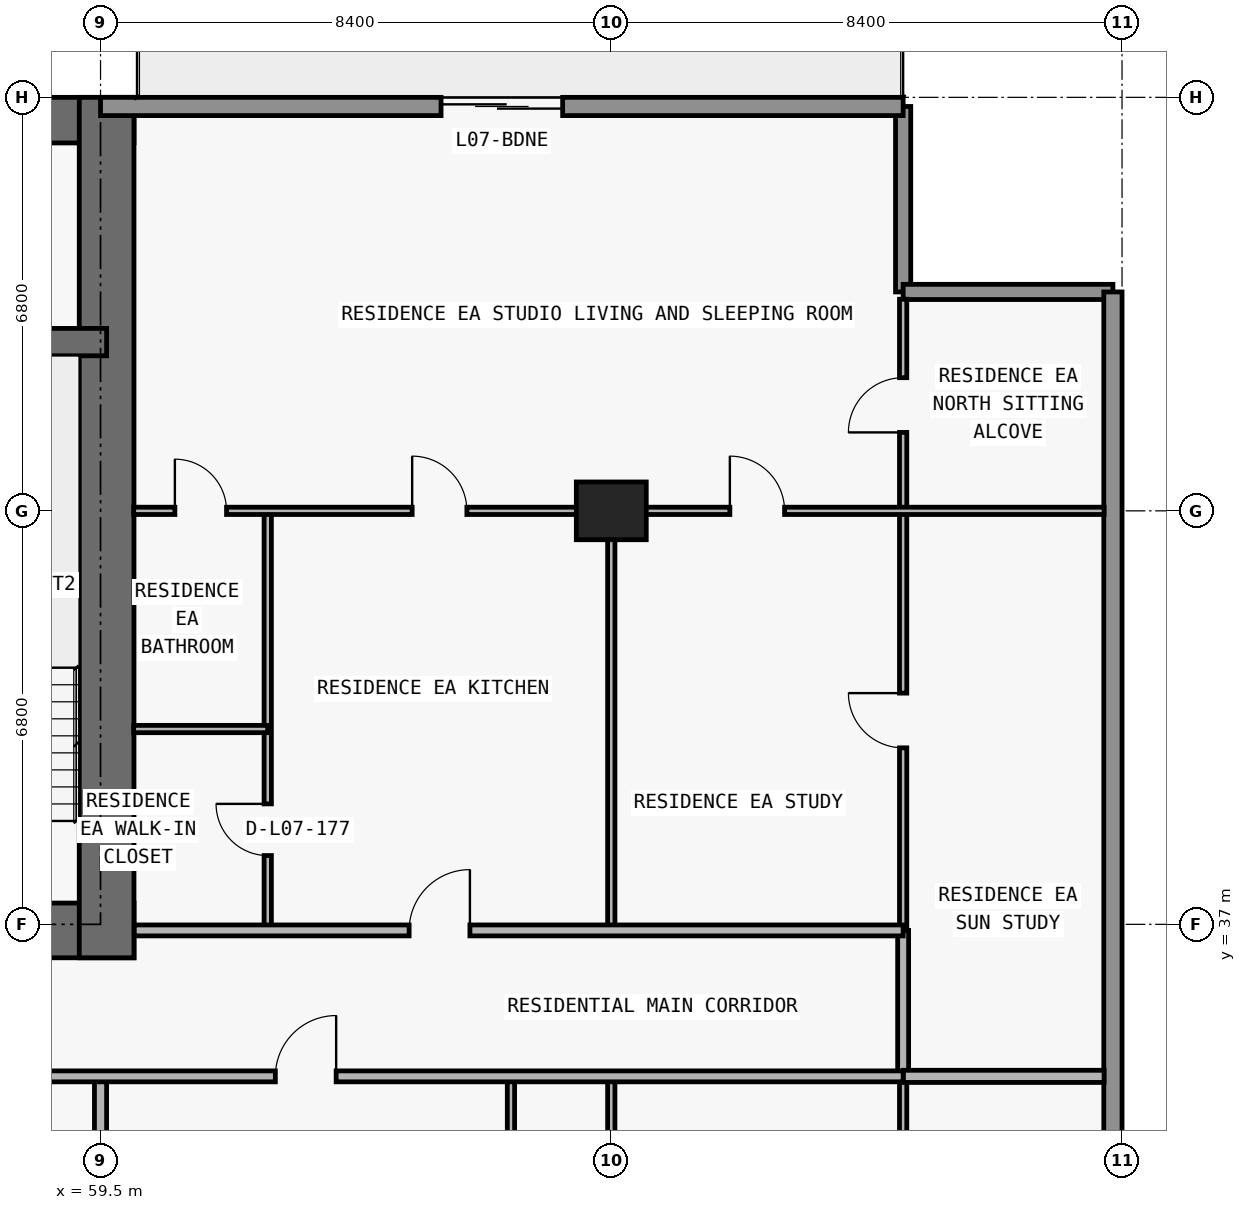
"""IFC4 building model, lengths in metres.
Left out: names, types, materials, properties, quantities, classifications, styles, units other than length and angle.
Written with IfcOpenShell. Run it as: python <this file> out.ifc"""

import sys

from ifc_helpers import new_model, si_unit, direction, frame, frame_2d, origin, origin_2d, place, context, subcontext, project, spatial, rectangle, extrude, element, fill, save


model = new_model("IFC4")
c1 = context("Model", 3, precision=1e-05, world=origin(), true_north=direction((0.0, 1.0)))
c2 = subcontext(c1, "Body", "Model", "MODEL_VIEW")
j1 = project(units=[si_unit("LENGTHUNIT", "METRE"), si_unit("PLANEANGLEUNIT", "RADIAN")], contexts=[c1])
p1 = place(None, origin())
s1 = spatial("IfcSite", under=j1, at=p1, CompositionType="ELEMENT")
p2 = place(p1, origin())
s2 = spatial("IfcBuilding", under=s1, at=p2, CompositionType="ELEMENT")
p3 = place(p2, frame((0.0, 0.0, 33.3)))
s3 = spatial("IfcBuildingStorey", under=s2, at=p3, CompositionType="ELEMENT", Elevation=33.3)
p4 = place(p3, frame((67.9, 43.8, 0.0), z_axis=(0.0, 0.0, 1.0), x_axis=(1.0, 0.0, 0.0)))
e1 = element("IfcColumn", 1, at=p4, inside=s3, PredefinedType="COLUMN", context=c2, shape_type="SweptSolid", body=[
    extrude(rectangle(XDim=1.15, YDim=0.95, at=origin_2d()), origin(), (0.0, 0.0, 1.0), 3.05),
])
p5 = place(p3, frame((17.75, 36.9, 0.0), z_axis=(0.0, 0.0, 1.0), x_axis=(1.0, 0.0, 0.0)))
e2 = element("IfcWall", 2, at=p5, inside=s3, PredefinedType="SHEAR", context=c2, shape_type="SweptSolid", body=[
    extrude(rectangle(XDim=42.3, YDim=0.9, at=frame_2d((21.15, 0.0))), origin(), (0.0, 0.0, 1.0), 3.05),
])
p6 = place(p5, frame((14.55, 0.0, 0.0)))
e3 = element("IfcOpeningElement", 3, at=p6, cuts=e2, PredefinedType="OPENING", context=c2, shape_type="SweptSolid", body=[
    extrude(rectangle(XDim=1.1, YDim=2.15, at=frame_2d((0.55, 1.075))), frame((0.0, 0.46, 0.0), z_axis=(0.0, -1.0, 0.0), x_axis=(1.0, 0.0, 0.0)), (0.0, 0.0, 1.0), 0.92),
])
p7 = place(p5, frame((6.4, 0.0, 0.0)))
e4 = element("IfcOpeningElement", 4, at=p7, cuts=e2, PredefinedType="OPENING", context=c2, shape_type="SweptSolid", body=[
    extrude(rectangle(XDim=1.05, YDim=2.15, at=frame_2d((0.525, 1.075))), frame((0.0, 0.46, 0.0), z_axis=(0.0, -1.0, 0.0), x_axis=(1.0, 0.0, 0.0)), (0.0, 0.0, 1.0), 0.92),
])
p8 = place(p5, frame((34.9, 0.0, 0.0)))
e5 = element("IfcOpeningElement", 5, at=p8, cuts=e2, PredefinedType="OPENING", context=c2, shape_type="SweptSolid", body=[
    extrude(rectangle(XDim=1.05, YDim=2.15, at=frame_2d((0.525, 1.075))), frame((0.0, 0.46, 0.0), z_axis=(0.0, -1.0, 0.0), x_axis=(1.0, 0.0, 0.0)), (0.0, 0.0, 1.0), 0.92),
])
p9 = place(p5, frame((11.012, 0.0, 0.0)))
e6 = element("IfcOpeningElement", 6, at=p9, cuts=e2, PredefinedType="OPENING", context=c2, shape_type="SweptSolid", body=[
    extrude(rectangle(XDim=1.05, YDim=2.15, at=frame_2d((0.525, 1.075))), frame((0.0, 0.46, 0.0), z_axis=(0.0, -1.0, 0.0), x_axis=(1.0, 0.0, 0.0)), (0.0, 0.0, 1.0), 0.92),
])
p10 = place(p5, frame((24.25, 0.0, 0.0)))
e7 = element("IfcOpeningElement", 7, at=p10, cuts=e2, PredefinedType="OPENING", context=c2, shape_type="SweptSolid", body=[
    extrude(rectangle(XDim=1.05, YDim=2.15, at=frame_2d((0.525, 1.075))), frame((0.0, 0.46, 0.0), z_axis=(0.0, -1.0, 0.0), x_axis=(1.0, 0.0, 0.0)), (0.0, 0.0, 1.0), 0.92),
])
p11 = place(p3, frame((17.75, 50.225, 0.0), z_axis=(0.0, 0.0, 1.0), x_axis=(1.0, 0.0, 0.0)))
e8 = element("IfcWall", 8, at=p11, inside=s3, PredefinedType="SHEAR", context=c2, shape_type="SweptSolid", body=[
    extrude(rectangle(XDim=42.3, YDim=0.75, at=frame_2d((21.15, 0.0))), origin(), (0.0, 0.0, 1.0), 3.05),
])
p12 = place(p3, frame((59.6, 36.45, 0.0), z_axis=(0.0, 0.0, 1.0), x_axis=(0.0, 1.0, 0.0)))
e9 = element("IfcWall", 9, at=p12, inside=s3, PredefinedType="SHEAR", context=c2, shape_type="SweptSolid", body=[
    extrude(rectangle(XDim=14.15, YDim=0.9, at=frame_2d((7.075, 0.0))), origin(), (0.0, 0.0, 1.0), 3.05),
])
p13 = place(p3, frame((18.2, 46.575, 0.0), z_axis=(0.0, 0.0, 1.0), x_axis=(1.0, 0.0, 0.0)))
e10 = element("IfcWall", 10, at=p13, inside=s3, PredefinedType="SHEAR", context=c2, shape_type="SweptSolid", body=[
    extrude(rectangle(XDim=41.4, YDim=0.45, at=frame_2d((20.7, 0.0))), origin(), (0.0, 0.0, 1.0), 3.05),
])
p14 = place(p13, frame((7.675, 0.0, 0.0)))
e11 = element("IfcOpeningElement", 11, at=p14, cuts=e10, PredefinedType="OPENING", context=c2, shape_type="SweptSolid", body=[
    extrude(rectangle(XDim=1.05, YDim=2.15, at=frame_2d((0.525, 1.075))), frame((0.0, 0.235, 0.0), z_axis=(0.0, -1.0, 0.0), x_axis=(1.0, 0.0, 0.0)), (0.0, 0.0, 1.0), 0.47),
])
p15 = place(p13, frame((32.725, 0.0, 0.0)))
e12 = element("IfcOpeningElement", 12, at=p15, cuts=e10, PredefinedType="OPENING", context=c2, shape_type="SweptSolid", body=[
    extrude(rectangle(XDim=1.05, YDim=2.15, at=frame_2d((0.525, 1.075))), frame((0.0, 0.235, 0.0), z_axis=(0.0, -1.0, 0.0), x_axis=(1.0, 0.0, 0.0)), (0.0, 0.0, 1.0), 0.47),
])
p16 = place(p3, frame((72.7, 50.45, 0.0), z_axis=(0.0, 0.0, 1.0), x_axis=(0.0, -1.0, 0.0)))
e13 = element("IfcWall", 13, at=p16, inside=s3, PredefinedType="ELEMENTEDWALL", context=c2, shape_type="SweptSolid", body=[
    extrude(rectangle(XDim=3.05, YDim=0.25, at=frame_2d((1.525, 0.0))), origin(), (0.0, 0.0, 1.0), 3.05),
])
p17 = place(p3, frame((72.7, 47.4, 0.0), z_axis=(0.0, 0.0, 1.0), x_axis=(1.0, 0.0, 0.0)))
e14 = element("IfcWall", 14, at=p17, inside=s3, PredefinedType="ELEMENTEDWALL", context=c2, shape_type="SweptSolid", body=[
    extrude(rectangle(XDim=3.45, YDim=0.25, at=frame_2d((1.725, 0.0))), origin(), (0.0, 0.0, 1.0), 3.05),
])
p18 = place(p3, frame((76.15, 47.4, 0.0), z_axis=(0.0, 0.0, 1.0), x_axis=(0.0, -1.0, 0.0)))
e15 = element("IfcWall", 15, at=p18, inside=s3, PredefinedType="STANDARD", context=c2, shape_type="SweptSolid", body=[
    extrude(rectangle(XDim=20.6, YDim=0.3, at=frame_2d((10.3, 0.0))), origin(), (0.0, 0.0, 1.0), 3.05),
])
p19 = place(p3, frame((59.5, 50.45, 0.0), z_axis=(0.0, 0.0, 1.0), x_axis=(1.0, 0.0, 0.0)))
e16 = element("IfcWall", 16, at=p19, inside=s3, PredefinedType="STANDARD", context=c2, shape_type="SweptSolid", body=[
    extrude(rectangle(XDim=13.2, YDim=0.3, at=frame_2d((6.6, 0.0))), origin(), (0.0, 0.0, 1.0), 3.05),
])
p20 = place(p19, frame((5.6, 0.0, 0.0)))
e17 = element("IfcOpeningElement", 17, at=p20, cuts=e16, PredefinedType="OPENING", context=c2, shape_type="SweptSolid", body=[
    extrude(rectangle(XDim=2.0, YDim=2.3, at=frame_2d((1.0, 1.15))), frame((0.0, 0.16, 0.0), z_axis=(0.0, -1.0, 0.0), x_axis=(1.0, 0.0, 0.0)), (0.0, 0.0, 1.0), 0.32),
])
p21 = place(p3, frame((59.5, 27.64, 0.0), z_axis=(0.0, 0.0, 1.0), x_axis=(0.0, 1.0, 0.0)))
e18 = element("IfcWall", 18, at=p21, inside=s3, PredefinedType="PARTITIONING", context=c2, shape_type="SweptSolid", body=[
    extrude(rectangle(XDim=6.86, YDim=0.2, at=frame_2d((3.43, 0.0))), origin(), (0.0, 0.0, 1.0), 2.11),
])
p22 = place(p3, frame((62.25, 36.9, 0.0), z_axis=(0.0, 0.0, 1.0), x_axis=(0.0, 1.0, 0.0)))
e19 = element("IfcWall", 19, at=p22, inside=s3, PredefinedType="PARTITIONING", context=c2, shape_type="SweptSolid", body=[
    extrude(rectangle(XDim=6.9, YDim=0.12, at=frame_2d((3.45, 0.0))), origin(), (0.0, 0.0, 1.0), 3.05),
])
p23 = place(p22, frame((1.231, 0.0, 0.0)))
e20 = element("IfcOpeningElement", 20, at=p23, cuts=e19, PredefinedType="OPENING", context=c2, shape_type="SweptSolid", body=[
    extrude(rectangle(XDim=0.85, YDim=2.1, at=frame_2d((0.425, 1.05))), frame((0.0, 0.07, 0.0), z_axis=(0.0, -1.0, 0.0), x_axis=(1.0, 0.0, 0.0)), (0.0, 0.0, 1.0), 0.14),
])
p24 = place(p3, frame((66.25, 27.64, 0.0), z_axis=(0.0, 0.0, 1.0), x_axis=(0.0, 1.0, 0.0)))
e21 = element("IfcWall", 21, at=p24, inside=s3, PredefinedType="PARTITIONING", context=c2, shape_type="SweptSolid", body=[
    extrude(rectangle(XDim=6.86, YDim=0.12, at=frame_2d((3.43, 0.0))), origin(), (0.0, 0.0, 1.0), 3.05),
])
p25 = place(p24, frame((3.005, 0.0, 0.0)))
e22 = element("IfcOpeningElement", 22, at=p25, cuts=e21, PredefinedType="OPENING", context=c2, shape_type="SweptSolid", body=[
    extrude(rectangle(XDim=0.85, YDim=2.1, at=frame_2d((0.425, 1.05))), frame((0.0, 0.07, 0.0), z_axis=(0.0, -1.0, 0.0), x_axis=(1.0, 0.0, 0.0)), (0.0, 0.0, 1.0), 0.14),
])
p26 = place(p3, frame((67.9, 27.64, 0.0), z_axis=(0.0, 0.0, 1.0), x_axis=(0.0, 1.0, 0.0)))
e23 = element("IfcWall", 23, at=p26, inside=s3, PredefinedType="PARTITIONING", context=c2, shape_type="SweptSolid", body=[
    extrude(rectangle(XDim=6.86, YDim=0.12, at=frame_2d((3.43, 0.0))), origin(), (0.0, 0.0, 1.0), 2.11),
])
p27 = place(p3, frame((67.9, 36.9, 0.0), z_axis=(0.0, 0.0, 1.0), x_axis=(0.0, 1.0, 0.0)))
e24 = element("IfcWall", 24, at=p27, inside=s3, PredefinedType="PARTITIONING", context=c2, shape_type="SweptSolid", body=[
    extrude(rectangle(XDim=6.9, YDim=0.12, at=frame_2d((3.45, 0.0))), origin(), (0.0, 0.0, 1.0), 2.11),
])
p28 = place(p3, frame((72.7, 27.64, 0.0), z_axis=(0.0, 0.0, 1.0), x_axis=(0.0, 1.0, 0.0)))
e25 = element("IfcWall", 25, at=p28, inside=s3, PredefinedType="PARTITIONING", context=c2, shape_type="SweptSolid", body=[
    extrude(rectangle(XDim=6.86, YDim=0.12, at=frame_2d((3.43, 0.0))), origin(), (0.0, 0.0, 1.0), 3.05),
])
p29 = place(p3, frame((72.7, 34.505, 0.0), z_axis=(0.0, 0.0, 1.0), x_axis=(0.0, 1.0, 0.0)))
e26 = element("IfcWall", 26, at=p29, inside=s3, PredefinedType="PARTITIONING", context=c2, shape_type="SweptSolid", body=[
    extrude(rectangle(XDim=2.395, YDim=0.18, at=frame_2d((1.198, 0.0))), origin(), (0.0, 0.0, 1.0), 3.05),
])
p30 = place(p3, frame((72.7, 36.905, 0.0), z_axis=(0.0, 0.0, 1.0), x_axis=(0.0, 1.0, 0.0)))
e27 = element("IfcWall", 27, at=p30, inside=s3, PredefinedType="PARTITIONING", context=c2, shape_type="SweptSolid", body=[
    extrude(rectangle(XDim=10.375, YDim=0.12, at=frame_2d((5.188, 0.0))), origin(), (0.0, 0.0, 1.0), 3.05),
])
p31 = place(p30, frame((2.998, 0.0, 0.0)))
e28 = element("IfcOpeningElement", 28, at=p31, cuts=e27, PredefinedType="OPENING", context=c2, shape_type="SweptSolid", body=[
    extrude(rectangle(XDim=0.9, YDim=2.15, at=frame_2d((0.45, 1.075))), frame((0.0, 0.07, 0.0), z_axis=(0.0, -1.0, 0.0), x_axis=(1.0, 0.0, 0.0)), (0.0, 0.0, 1.0), 0.14),
])
p32 = place(p30, frame((8.185, 0.0, 0.0)))
e29 = element("IfcOpeningElement", 29, at=p32, cuts=e27, PredefinedType="OPENING", context=c2, shape_type="SweptSolid", body=[
    extrude(rectangle(XDim=0.9, YDim=2.15, at=frame_2d((0.45, 1.075))), frame((0.0, 0.07, 0.0), z_axis=(0.0, -1.0, 0.0), x_axis=(1.0, 0.0, 0.0)), (0.0, 0.0, 1.0), 0.14),
])
p33 = place(p3, frame((55.9, 34.5, 0.0), z_axis=(0.0, 0.0, 1.0), x_axis=(1.0, 0.0, 0.0)))
e30 = element("IfcWall", 30, at=p33, inside=s3, PredefinedType="PARTITIONING", context=c2, shape_type="SweptSolid", body=[
    extrude(rectangle(XDim=16.8, YDim=0.18, at=frame_2d((8.4, 0.0))), origin(), (0.0, 0.0, 1.0), 3.05),
])
p34 = place(p33, frame((6.475, 0.0, 0.0)))
e31 = element("IfcOpeningElement", 31, at=p34, cuts=e30, PredefinedType="OPENING", context=c2, shape_type="SweptSolid", body=[
    extrude(rectangle(XDim=1.0, YDim=2.2, at=frame_2d((0.5, 1.1))), frame((0.0, 0.1, 0.0), z_axis=(0.0, -1.0, 0.0), x_axis=(1.0, 0.0, 0.0)), (0.0, 0.0, 1.0), 0.2),
])
p35 = place(p3, frame((72.705, 34.5, 0.0), z_axis=(0.0, 0.0, 1.0), x_axis=(1.0, 0.0, 0.0)))
e32 = element("IfcWall", 32, at=p35, inside=s3, PredefinedType="PARTITIONING", context=c2, shape_type="SweptSolid", body=[
    extrude(rectangle(XDim=3.3, YDim=0.2, at=frame_2d((1.65, 0.0))), origin(), (0.0, 0.0, 1.0), 3.05),
])
p36 = place(p3, frame((60.055, 36.9, 0.0), z_axis=(0.0, 0.0, 1.0), x_axis=(1.0, 0.0, 0.0)))
e33 = element("IfcWall", 33, at=p36, inside=s3, PredefinedType="PARTITIONING", context=c2, shape_type="SweptSolid", body=[
    extrude(rectangle(XDim=12.645, YDim=0.18, at=frame_2d((6.323, 0.0))), origin(), (0.0, 0.0, 1.0), 3.05),
])
p37 = place(p36, frame((4.52, 0.0, 0.0)))
e34 = element("IfcOpeningElement", 34, at=p37, cuts=e33, PredefinedType="OPENING", context=c2, shape_type="SweptSolid", body=[
    extrude(rectangle(XDim=1.0, YDim=2.2, at=frame_2d((0.5, 1.1))), frame((0.0, 0.1, 0.0), z_axis=(0.0, -1.0, 0.0), x_axis=(1.0, 0.0, 0.0)), (0.0, 0.0, 1.0), 0.2),
])
p38 = place(p3, frame((60.045, 40.212, 0.0), z_axis=(0.0, 0.0, 1.0), x_axis=(1.0, 0.0, 0.0)))
e35 = element("IfcWall", 35, at=p38, inside=s3, PredefinedType="PARTITIONING", context=c2, shape_type="SweptSolid", body=[
    extrude(rectangle(XDim=2.205, YDim=0.12, at=frame_2d((1.103, 0.0))), origin(), (0.0, 0.0, 1.0), 3.05),
])
p39 = place(p3, frame((60.045, 43.8, 0.0), z_axis=(0.0, 0.0, 1.0), x_axis=(1.0, 0.0, 0.0)))
e36 = element("IfcWall", 36, at=p39, inside=s3, PredefinedType="PARTITIONING", context=c2, shape_type="SweptSolid", body=[
    extrude(rectangle(XDim=15.96, YDim=0.12, at=frame_2d((7.98, 0.0))), origin(), (0.0, 0.0, 1.0), 2.339),
])
p40 = place(p39, frame((9.805, 0.0, 0.0)))
e37 = element("IfcOpeningElement", 37, at=p40, cuts=e36, PredefinedType="OPENING", context=c2, shape_type="SweptSolid", body=[
    extrude(rectangle(XDim=0.9, YDim=2.15, at=frame_2d((0.45, 1.075))), frame((0.0, 0.07, 0.0), z_axis=(0.0, -1.0, 0.0), x_axis=(1.0, 0.0, 0.0)), (0.0, 0.0, 1.0), 0.14),
])
p41 = place(p39, frame((4.58, 0.0, 0.0)))
e38 = element("IfcOpeningElement", 38, at=p41, cuts=e36, PredefinedType="OPENING", context=c2, shape_type="SweptSolid", body=[
    extrude(rectangle(XDim=0.9, YDim=2.15, at=frame_2d((0.45, 1.075))), frame((0.0, 0.07, 0.0), z_axis=(0.0, -1.0, 0.0), x_axis=(1.0, 0.0, 0.0)), (0.0, 0.0, 1.0), 0.14),
])
p42 = place(p39, frame((0.677, 0.0, 0.0)))
e39 = element("IfcOpeningElement", 39, at=p42, cuts=e36, PredefinedType="OPENING", context=c2, shape_type="SweptSolid", body=[
    extrude(rectangle(XDim=0.85, YDim=2.1, at=frame_2d((0.425, 1.05))), frame((0.0, 0.07, 0.0), z_axis=(0.0, -1.0, 0.0), x_axis=(1.0, 0.0, 0.0)), (0.0, 0.0, 1.0), 0.14),
])
p43 = place(p20, origin())
e40 = element("IfcDoor", 40, at=p43, inside=s3, OperationType="DOUBLE_DOOR_SLIDING", PredefinedType="DOOR", context=c2, shape_type="SweptSolid", body=[
    extrude(rectangle(XDim=2.0, YDim=2.3, at=frame_2d((1.0, 1.15))), frame((0.0, 0.025, 0.0), z_axis=(0.0, -1.0, 0.0), x_axis=(1.0, 0.0, 0.0)), (0.0, 0.0, 1.0), 0.05),
])
fill(e17, e40)
p44 = place(p34, origin())
e41 = element("IfcDoor", 41, at=p44, inside=s3, OperationType="SINGLE_SWING_RIGHT", PredefinedType="DOOR", context=c2, shape_type="SweptSolid", body=[
    extrude(rectangle(XDim=1.0, YDim=2.2, at=frame_2d((0.5, 1.1))), frame((0.0, 0.025, 0.0), z_axis=(0.0, -1.0, 0.0), x_axis=(1.0, 0.0, 0.0)), (0.0, 0.0, 1.0), 0.05),
])
fill(e31, e41)
p45 = place(p40, origin())
e42 = element("IfcDoor", 42, at=p45, inside=s3, OperationType="SINGLE_SWING_LEFT", PredefinedType="DOOR", context=c2, shape_type="SweptSolid", body=[
    extrude(rectangle(XDim=0.9, YDim=2.15, at=frame_2d((0.45, 1.075))), frame((0.0, 0.025, 0.0), z_axis=(0.0, -1.0, 0.0), x_axis=(1.0, 0.0, 0.0)), (0.0, 0.0, 1.0), 0.05),
])
fill(e37, e42)
p46 = place(p37, origin())
e43 = element("IfcDoor", 43, at=p46, inside=s3, OperationType="SINGLE_SWING_RIGHT", PredefinedType="DOOR", context=c2, shape_type="SweptSolid", body=[
    extrude(rectangle(XDim=1.0, YDim=2.2, at=frame_2d((0.5, 1.1))), frame((0.0, 0.025, 0.0), z_axis=(0.0, -1.0, 0.0), x_axis=(1.0, 0.0, 0.0)), (0.0, 0.0, 1.0), 0.05),
])
fill(e34, e43)
p47 = place(p41, origin())
e44 = element("IfcDoor", 44, at=p47, inside=s3, OperationType="SINGLE_SWING_LEFT", PredefinedType="DOOR", context=c2, shape_type="SweptSolid", body=[
    extrude(rectangle(XDim=0.9, YDim=2.15, at=frame_2d((0.45, 1.075))), frame((0.0, 0.025, 0.0), z_axis=(0.0, -1.0, 0.0), x_axis=(1.0, 0.0, 0.0)), (0.0, 0.0, 1.0), 0.05),
])
fill(e38, e44)
p48 = place(p23, origin())
e45 = element("IfcDoor", 45, at=p48, inside=s3, OperationType="SINGLE_SWING_RIGHT", PredefinedType="DOOR", context=c2, shape_type="SweptSolid", body=[
    extrude(rectangle(XDim=0.85, YDim=2.1, at=frame_2d((0.425, 1.05))), frame((0.0, 0.025, 0.0), z_axis=(0.0, -1.0, 0.0), x_axis=(1.0, 0.0, 0.0)), (0.0, 0.0, 1.0), 0.05),
])
fill(e20, e45)
p49 = place(p42, origin())
e46 = element("IfcDoor", 46, at=p49, inside=s3, OperationType="SINGLE_SWING_LEFT", PredefinedType="DOOR", context=c2, shape_type="SweptSolid", body=[
    extrude(rectangle(XDim=0.85, YDim=2.1, at=frame_2d((0.425, 1.05))), frame((0.0, 0.025, 0.0), z_axis=(0.0, -1.0, 0.0), x_axis=(1.0, 0.0, 0.0)), (0.0, 0.0, 1.0), 0.05),
])
fill(e39, e46)
p50 = place(p31, origin())
e47 = element("IfcDoor", 47, at=p50, inside=s3, OperationType="SINGLE_SWING_RIGHT", PredefinedType="DOOR", context=c2, shape_type="SweptSolid", body=[
    extrude(rectangle(XDim=0.9, YDim=2.15, at=frame_2d((0.45, 1.075))), frame((0.0, 0.025, 0.0), z_axis=(0.0, -1.0, 0.0), x_axis=(1.0, 0.0, 0.0)), (0.0, 0.0, 1.0), 0.05),
])
fill(e28, e47)
p51 = place(p32, origin())
e48 = element("IfcDoor", 48, at=p51, inside=s3, OperationType="SINGLE_SWING_LEFT", PredefinedType="DOOR", context=c2, shape_type="SweptSolid", body=[
    extrude(rectangle(XDim=0.9, YDim=2.15, at=frame_2d((0.45, 1.075))), frame((0.0, 0.025, 0.0), z_axis=(0.0, -1.0, 0.0), x_axis=(1.0, 0.0, 0.0)), (0.0, 0.0, 1.0), 0.05),
])
fill(e29, e48)
save(model, sys.argv[1])
